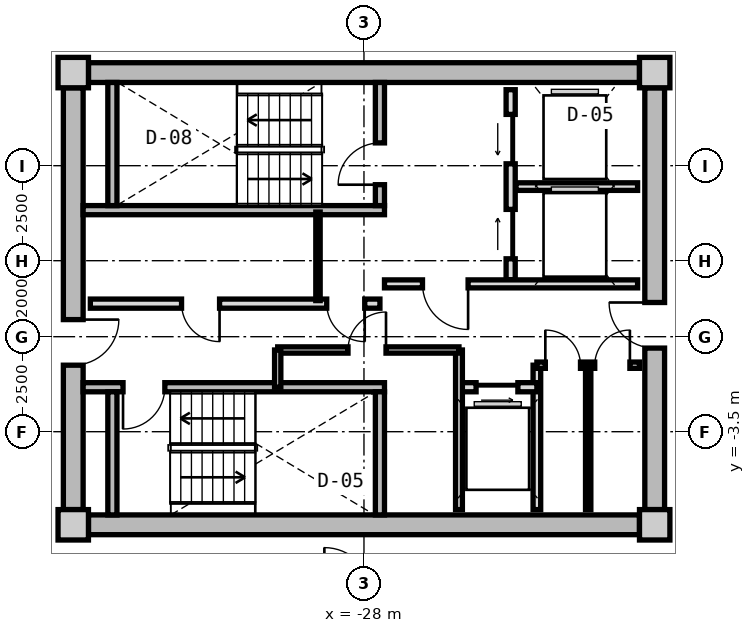
"""IFC4 building model, lengths in metres.
Left out: names, types, materials, properties, quantities, classifications, styles, units other than length and angle.
Written with IfcOpenShell. Run it as: python <this file> out.ifc"""

import sys

from ifc_helpers import new_model, si_unit, direction, frame, frame_2d, origin, origin_2d, place, context, subcontext, project, spatial, rectangle, extrude, source, transform, mapped, element, fill, save


model = new_model("IFC4")
c1 = context("Model", 3, precision=1e-05, world=origin(), true_north=direction((0.0, 1.0)))
c2 = subcontext(c1, "Body", "Model", "MODEL_VIEW")
j1 = project(units=[si_unit("LENGTHUNIT", "METRE"), si_unit("PLANEANGLEUNIT", "RADIAN")], contexts=[c1])
p1 = place(None, origin())
s1 = spatial("IfcSite", under=j1, at=p1, CompositionType="ELEMENT")
p2 = place(p1, origin())
s2 = spatial("IfcBuilding", under=s1, at=p2, CompositionType="ELEMENT")
p3 = place(p2, frame((0.0, 0.0, 238.3)))
s3 = spatial("IfcBuildingStorey", under=s2, at=p3, CompositionType="ELEMENT", Elevation=238.3)
m1 = source(origin(), c2, "Body", "SweptSolid", [
    extrude(rectangle(XDim=0.8, YDim=0.8, at=origin_2d()), origin(), (0.0, 0.0, 1.0), 3.05),
])
for number, where, z_axis, x_axis in (
    (1, (-35.65, -5.95, 0.0), (0.0, 0.0, 1.0), (1.0, 0.0, 0.0)),
    (2, (-20.35, -5.95, 0.0), (0.0, 0.0, 1.0), (1.0, 0.0, 0.0)),
    (3, (-20.35, 5.95, 0.0), (0.0, 0.0, 1.0), (1.0, 0.0, 0.0)),
    (4, (-35.65, 5.95, 0.0), (0.0, 0.0, 1.0), (1.0, 0.0, 0.0)),
):
    element("IfcColumn", number, at=place(p3, frame(where, z_axis=z_axis, x_axis=x_axis)), inside=s3, PredefinedType="COLUMN", context=c2, shape_type="MappedRepresentation", body=[
        mapped(m1, transform((0.0, 0.0, 0.0), x_axis=(1.0, 0.0, 0.0), y_axis=(0.0, 1.0, 0.0), z_axis=(0.0, 0.0, 1.0), scale=1.0)),
    ])
m2 = source(origin(), c2, "Body", "SweptSolid", [
    extrude(rectangle(XDim=14.5, YDim=0.52, at=frame_2d((7.25, 0.0))), origin(), (0.0, 0.0, 1.0), 2.81),
])
for number, where, z_axis, x_axis in (
    (5, (-35.25, 5.95, 0.0), (0.0, 0.0, 1.0), (1.0, 0.0, 0.0)),
    (6, (-20.75, -5.95, 0.0), (0.0, 0.0, 1.0), (-1.0, 0.0, 0.0)),
):
    element("IfcWall", number, at=place(p3, frame(where, z_axis=z_axis, x_axis=x_axis)), inside=s3, PredefinedType="SHEAR", context=c2, shape_type="MappedRepresentation", body=[
        mapped(m2, transform((0.0, 0.0, 0.0), x_axis=(1.0, 0.0, 0.0), y_axis=(0.0, 1.0, 0.0), z_axis=(0.0, 0.0, 1.0), scale=1.0)),
    ])
m3 = source(origin(), c2, "Body", "SweptSolid", [
    extrude(rectangle(XDim=11.1, YDim=0.52, at=frame_2d((5.55, 0.0))), origin(), (0.0, 0.0, 1.0), 2.81),
])
p4 = place(p3, frame((-35.65, -5.55, 0.0), z_axis=(0.0, 0.0, 1.0), x_axis=(0.0, 1.0, 0.0)))
e7 = element("IfcWall", 7, at=p4, inside=s3, PredefinedType="SHEAR", context=c2, shape_type="MappedRepresentation", body=[
    mapped(m3, transform((0.0, 0.0, 0.0), x_axis=(1.0, 0.0, 0.0), y_axis=(0.0, 1.0, 0.0), z_axis=(0.0, 0.0, 1.0), scale=1.0)),
])
p5 = place(p4, frame((3.8, 0.0, 0.0)))
e8 = element("IfcOpeningElement", 8, at=p5, cuts=e7, PredefinedType="OPENING", context=c2, shape_type="SweptSolid", body=[
    extrude(rectangle(XDim=1.2, YDim=2.15, at=frame_2d((0.6, 1.075))), frame((0.0, 0.27, 0.0), z_axis=(0.0, -1.0, 0.0), x_axis=(1.0, 0.0, 0.0)), (0.0, 0.0, 1.0), 0.54),
])
p6 = place(p3, frame((-20.35, 5.55, 0.0), z_axis=(0.0, 0.0, 1.0), x_axis=(0.0, -1.0, 0.0)))
e9 = element("IfcWall", 9, at=p6, inside=s3, PredefinedType="SHEAR", context=c2, shape_type="MappedRepresentation", body=[
    mapped(m3, transform((0.0, 0.0, 0.0), x_axis=(1.0, 0.0, 0.0), y_axis=(0.0, 1.0, 0.0), z_axis=(0.0, 0.0, 1.0), scale=1.0)),
])
p7 = place(p6, frame((5.65, 0.0, 0.0)))
e10 = element("IfcOpeningElement", 10, at=p7, cuts=e9, PredefinedType="OPENING", context=c2, shape_type="SweptSolid", body=[
    extrude(rectangle(XDim=1.2, YDim=2.15, at=frame_2d((0.6, 1.075))), frame((0.0, 0.27, 0.0), z_axis=(0.0, -1.0, 0.0), x_axis=(1.0, 0.0, 0.0)), (0.0, 0.0, 1.0), 0.54),
])
m4 = source(origin(), c2, "Body", "SweptSolid", [
    extrude(rectangle(XDim=7.93, YDim=0.24, at=frame_2d((3.965, 0.0))), origin(), (0.0, 0.0, 1.0), 2.81),
])
p8 = place(p3, frame((-35.39, 2.33, 0.0), z_axis=(0.0, 0.0, 1.0), x_axis=(1.0, 0.0, 0.0)))
e11 = element("IfcWall", 11, at=p8, inside=s3, PredefinedType="PARTITIONING", context=c2, shape_type="MappedRepresentation", body=[
    mapped(m4, transform((0.0, 0.0, 0.0), x_axis=(1.0, 0.0, 0.0), y_axis=(0.0, 1.0, 0.0), z_axis=(0.0, 0.0, 1.0), scale=1.0)),
])
m5 = source(origin(), c2, "Body", "SweptSolid", [
    extrude(rectangle(XDim=3.24, YDim=0.24, at=frame_2d((1.62, 0.0))), origin(), (0.0, 0.0, 1.0), 2.81),
])
p9 = place(p3, frame((-34.62, 2.45, 0.0), z_axis=(0.0, 0.0, 1.0), x_axis=(0.0, 1.0, 0.0)))
e12 = element("IfcWall", 12, at=p9, inside=s3, PredefinedType="PARTITIONING", context=c2, shape_type="MappedRepresentation", body=[
    mapped(m5, transform((0.0, 0.0, 0.0), x_axis=(1.0, 0.0, 0.0), y_axis=(0.0, 1.0, 0.0), z_axis=(0.0, 0.0, 1.0), scale=1.0)),
])
p10 = place(p3, frame((-27.58, 2.45, 0.0), z_axis=(0.0, 0.0, 1.0), x_axis=(0.0, 1.0, 0.0)))
e13 = element("IfcWall", 13, at=p10, inside=s3, PredefinedType="PARTITIONING", context=c2, shape_type="MappedRepresentation", body=[
    mapped(m5, transform((0.0, 0.0, 0.0), x_axis=(1.0, 0.0, 0.0), y_axis=(0.0, 1.0, 0.0), z_axis=(0.0, 0.0, 1.0), scale=1.0)),
])
p11 = place(p10, frame((0.55, 0.0, 0.0)))
e14 = element("IfcOpeningElement", 14, at=p11, cuts=e13, PredefinedType="OPENING", context=c2, shape_type="SweptSolid", body=[
    extrude(rectangle(XDim=1.1, YDim=2.15, at=frame_2d((0.55, 1.075))), frame((0.0, 0.13, 0.0), z_axis=(0.0, -1.0, 0.0), x_axis=(1.0, 0.0, 0.0)), (0.0, 0.0, 1.0), 0.26),
])
p12 = place(p3, frame((-35.39, -2.33, 0.0), z_axis=(0.0, 0.0, 1.0), x_axis=(1.0, 0.0, 0.0)))
e15 = element("IfcWall", 15, at=p12, inside=s3, PredefinedType="PARTITIONING", context=c2, shape_type="MappedRepresentation", body=[
    mapped(m4, transform((0.0, 0.0, 0.0), x_axis=(1.0, 0.0, 0.0), y_axis=(0.0, 1.0, 0.0), z_axis=(0.0, 0.0, 1.0), scale=1.0)),
])
p13 = place(p12, frame((1.05, 0.0, 0.0)))
e16 = element("IfcOpeningElement", 16, at=p13, cuts=e15, PredefinedType="OPENING", context=c2, shape_type="SweptSolid", body=[
    extrude(rectangle(XDim=1.1, YDim=2.15, at=frame_2d((0.55, 1.075))), frame((0.0, 0.13, 0.0), z_axis=(0.0, -1.0, 0.0), x_axis=(1.0, 0.0, 0.0)), (0.0, 0.0, 1.0), 0.26),
])
for number, where, z_axis, x_axis in (
    (17, (-34.62, -5.69, 0.0), (0.0, 0.0, 1.0), (0.0, 1.0, 0.0)),
    (18, (-27.58, -5.69, 0.0), (0.0, 0.0, 1.0), (0.0, 1.0, 0.0)),
):
    element("IfcWall", number, at=place(p3, frame(where, z_axis=z_axis, x_axis=x_axis)), inside=s3, PredefinedType="PARTITIONING", context=c2, shape_type="MappedRepresentation", body=[
        mapped(m5, transform((0.0, 0.0, 0.0), x_axis=(1.0, 0.0, 0.0), y_axis=(0.0, 1.0, 0.0), z_axis=(0.0, 0.0, 1.0), scale=1.0)),
    ])
m6 = source(origin(), c2, "Body", "SweptSolid", [
    extrude(rectangle(XDim=5.0, YDim=0.24, at=frame_2d((2.5, 0.0))), origin(), (0.0, 0.0, 1.0), 2.795),
])
p14 = place(p3, frame((-24.14, 0.5, 0.0), z_axis=(0.0, 0.0, 1.0), x_axis=(0.0, 1.0, 0.0)))
e19 = element("IfcWall", 19, at=p14, inside=s3, PredefinedType="PARTITIONING", context=c2, shape_type="MappedRepresentation", body=[
    mapped(m6, transform((0.0, 0.0, 0.0), x_axis=(1.0, 0.0, 0.0), y_axis=(0.0, 1.0, 0.0), z_axis=(0.0, 0.0, 1.0), scale=1.0)),
])
p15 = place(p14, frame((3.05, 0.0, 0.0)))
e20 = element("IfcOpeningElement", 20, at=p15, cuts=e19, PredefinedType="OPENING", context=c2, shape_type="SweptSolid", body=[
    extrude(rectangle(XDim=1.3, YDim=2.2, at=frame_2d((0.65, 1.1))), frame((0.0, 0.13, 0.0), z_axis=(0.0, -1.0, 0.0), x_axis=(1.0, 0.0, 0.0)), (0.0, 0.0, 1.0), 0.26),
])
p16 = place(p14, frame((0.55, 0.0, 0.0)))
e21 = element("IfcOpeningElement", 21, at=p16, cuts=e19, PredefinedType="OPENING", context=c2, shape_type="SweptSolid", body=[
    extrude(rectangle(XDim=1.3, YDim=2.2, at=frame_2d((0.65, 1.1))), frame((0.0, 0.13, 0.0), z_axis=(0.0, -1.0, 0.0), x_axis=(1.0, 0.0, 0.0)), (0.0, 0.0, 1.0), 0.26),
])
m7 = source(origin(), c2, "Body", "SweptSolid", [
    extrude(rectangle(XDim=3.2, YDim=0.2, at=frame_2d((1.6, 0.0))), origin(), (0.0, 0.0, 1.0), 2.795),
])
p17 = place(p3, frame((-24.0, 2.95, 0.0), z_axis=(0.0, 0.0, 1.0), x_axis=(1.0, 0.0, 0.0)))
e22 = element("IfcWall", 22, at=p17, inside=s3, PredefinedType="PARTITIONING", context=c2, shape_type="MappedRepresentation", body=[
    mapped(m7, transform((0.0, 0.0, 0.0), x_axis=(1.0, 0.0, 0.0), y_axis=(0.0, 1.0, 0.0), z_axis=(0.0, 0.0, 1.0), scale=1.0)),
])
m8 = source(origin(), c2, "Body", "SweptSolid", [
    extrude(rectangle(XDim=6.66, YDim=0.21, at=frame_2d((3.33, 0.0))), origin(), (0.0, 0.0, 1.0), 2.795),
])
p18 = place(p3, frame((-27.46, 0.39, 0.0), z_axis=(0.0, 0.0, 1.0), x_axis=(1.0, 0.0, 0.0)))
e23 = element("IfcWall", 23, at=p18, inside=s3, PredefinedType="PARTITIONING", context=c2, shape_type="MappedRepresentation", body=[
    mapped(m8, transform((0.0, 0.0, 0.0), x_axis=(1.0, 0.0, 0.0), y_axis=(0.0, 1.0, 0.0), z_axis=(0.0, 0.0, 1.0), scale=1.0)),
])
p19 = place(p18, frame((1.0, 0.0, 0.0)))
e24 = element("IfcOpeningElement", 24, at=p19, cuts=e23, PredefinedType="OPENING", context=c2, shape_type="SweptSolid", body=[
    extrude(rectangle(XDim=1.2, YDim=2.15, at=frame_2d((0.6, 1.075))), frame((0.0, 0.115, 0.0), z_axis=(0.0, -1.0, 0.0), x_axis=(1.0, 0.0, 0.0)), (0.0, 0.0, 1.0), 0.23),
])
m9 = source(origin(), c2, "Body", "SweptSolid", [
    extrude(rectangle(XDim=7.62, YDim=0.24, at=frame_2d((3.81, 0.0))), origin(), (0.0, 0.0, 1.0), 2.795),
])
p20 = place(p3, frame((-35.2, -0.13, 0.0), z_axis=(0.0, 0.0, 1.0), x_axis=(1.0, 0.0, 0.0)))
e25 = element("IfcWall", 25, at=p20, inside=s3, PredefinedType="PARTITIONING", context=c2, shape_type="MappedRepresentation", body=[
    mapped(m9, transform((0.0, 0.0, 0.0), x_axis=(1.0, 0.0, 0.0), y_axis=(0.0, 1.0, 0.0), z_axis=(0.0, 0.0, 1.0), scale=1.0)),
])
p21 = place(p20, frame((6.22, 0.0, 0.0)))
e26 = element("IfcOpeningElement", 26, at=p21, cuts=e25, PredefinedType="OPENING", context=c2, shape_type="SweptSolid", body=[
    extrude(rectangle(XDim=1.0, YDim=2.1, at=frame_2d((0.5, 1.05))), frame((0.0, 0.13, 0.0), z_axis=(0.0, -1.0, 0.0), x_axis=(1.0, 0.0, 0.0)), (0.0, 0.0, 1.0), 0.26),
])
p22 = place(p20, frame((2.4, 0.0, 0.0)))
e27 = element("IfcOpeningElement", 27, at=p22, cuts=e25, PredefinedType="OPENING", context=c2, shape_type="SweptSolid", body=[
    extrude(rectangle(XDim=1.0, YDim=2.1, at=frame_2d((0.5, 1.05))), frame((0.0, 0.13, 0.0), z_axis=(0.0, -1.0, 0.0), x_axis=(1.0, 0.0, 0.0)), (0.0, 0.0, 1.0), 0.26),
])
m10 = source(origin(), c2, "Body", "SweptSolid", [
    extrude(rectangle(XDim=2.33, YDim=0.115, at=frame_2d((1.165, 0.0))), origin(), (0.0, 0.0, 1.0), 2.795),
])
p23 = place(p3, frame((-29.21, -0.05, 0.0), z_axis=(0.0, 0.0, 1.0), x_axis=(0.0, 1.0, 0.0)))
e28 = element("IfcWall", 28, at=p23, inside=s3, PredefinedType="PARTITIONING", context=c2, shape_type="MappedRepresentation", body=[
    mapped(m10, transform((0.0, 0.0, 0.0), x_axis=(1.0, 0.0, 0.0), y_axis=(0.0, 1.0, 0.0), z_axis=(0.0, 0.0, 1.0), scale=1.0)),
])
m11 = source(origin(), c2, "Body", "SweptSolid", [
    extrude(rectangle(XDim=3.8, YDim=0.2, at=frame_2d((1.9, 0.0))), origin(), (0.0, 0.0, 1.0), 2.795),
])
p24 = place(p3, frame((-23.45, -5.55, 0.0), z_axis=(0.0, 0.0, 1.0), x_axis=(0.0, 1.0, 0.0)))
e29 = element("IfcWall", 29, at=p24, inside=s3, PredefinedType="PARTITIONING", context=c2, shape_type="MappedRepresentation", body=[
    mapped(m11, transform((0.0, 0.0, 0.0), x_axis=(1.0, 0.0, 0.0), y_axis=(0.0, 1.0, 0.0), z_axis=(0.0, 0.0, 1.0), scale=1.0)),
])
m12 = source(origin(), c2, "Body", "SweptSolid", [
    extrude(rectangle(XDim=2.05, YDim=0.24, at=frame_2d((1.025, 0.0))), origin(), (0.0, 0.0, 1.0), 2.795),
])
p25 = place(p3, frame((-25.5, -2.33, 0.0), z_axis=(0.0, 0.0, 1.0), x_axis=(1.0, 0.0, 0.0)))
e30 = element("IfcWall", 30, at=p25, inside=s3, PredefinedType="PARTITIONING", context=c2, shape_type="MappedRepresentation", body=[
    mapped(m12, transform((0.0, 0.0, 0.0), x_axis=(1.0, 0.0, 0.0), y_axis=(0.0, 1.0, 0.0), z_axis=(0.0, 0.0, 1.0), scale=1.0)),
])
p26 = place(p25, frame((0.45, 0.0, 0.0)))
e31 = element("IfcOpeningElement", 31, at=p26, cuts=e30, PredefinedType="OPENING", context=c2, shape_type="SweptSolid", body=[
    extrude(rectangle(XDim=1.1, YDim=2.2, at=frame_2d((0.55, 1.1))), frame((0.0, 0.13, 0.0), z_axis=(0.0, -1.0, 0.0), x_axis=(1.0, 0.0, 0.0)), (0.0, 0.0, 1.0), 0.26),
])
m13 = source(origin(), c2, "Body", "SweptSolid", [
    extrude(rectangle(XDim=4.2, YDim=0.18, at=frame_2d((2.1, 0.0))), origin(), (0.0, 0.0, 1.0), 2.795),
])
p27 = place(p3, frame((-25.5, -5.55, 0.0), z_axis=(0.0, 0.0, 1.0), x_axis=(0.0, 1.0, 0.0)))
e32 = element("IfcWall", 32, at=p27, inside=s3, PredefinedType="PARTITIONING", context=c2, shape_type="MappedRepresentation", body=[
    mapped(m13, transform((0.0, 0.0, 0.0), x_axis=(1.0, 0.0, 0.0), y_axis=(0.0, 1.0, 0.0), z_axis=(0.0, 0.0, 1.0), scale=1.0)),
])
m14 = source(origin(), c2, "Body", "SweptSolid", [
    extrude(rectangle(XDim=4.77, YDim=0.165, at=frame_2d((2.385, 0.0))), origin(), (0.0, 0.0, 1.0), 2.795),
])
p28 = place(p3, frame((-30.27, -1.35, 0.0), z_axis=(0.0, 0.0, 1.0), x_axis=(1.0, 0.0, 0.0)))
e33 = element("IfcWall", 33, at=p28, inside=s3, PredefinedType="PARTITIONING", context=c2, shape_type="MappedRepresentation", body=[
    mapped(m14, transform((0.0, 0.0, 0.0), x_axis=(1.0, 0.0, 0.0), y_axis=(0.0, 1.0, 0.0), z_axis=(0.0, 0.0, 1.0), scale=1.0)),
])
p29 = place(p28, frame((1.85, 0.0, 0.0)))
e34 = element("IfcOpeningElement", 34, at=p29, cuts=e33, PredefinedType="OPENING", context=c2, shape_type="SweptSolid", body=[
    extrude(rectangle(XDim=1.0, YDim=2.1, at=frame_2d((0.5, 1.05))), frame((0.0, 0.093, 0.0), z_axis=(0.0, -1.0, 0.0), x_axis=(1.0, 0.0, 0.0)), (0.0, 0.0, 1.0), 0.185),
])
m15 = source(origin(), c2, "Body", "SweptSolid", [
    extrude(rectangle(XDim=0.98, YDim=0.165, at=frame_2d((0.49, 0.0))), origin(), (0.0, 0.0, 1.0), 2.795),
])
p30 = place(p3, frame((-30.27, -2.33, 0.0), z_axis=(0.0, 0.0, 1.0), x_axis=(0.0, 1.0, 0.0)))
e35 = element("IfcWall", 35, at=p30, inside=s3, PredefinedType="PARTITIONING", context=c2, shape_type="MappedRepresentation", body=[
    mapped(m15, transform((0.0, 0.0, 0.0), x_axis=(1.0, 0.0, 0.0), y_axis=(0.0, 1.0, 0.0), z_axis=(0.0, 0.0, 1.0), scale=1.0)),
])
m16 = source(origin(), c2, "Body", "SweptSolid", [
    extrude(rectangle(XDim=2.7, YDim=0.165, at=frame_2d((1.35, 0.0))), origin(), (0.0, 0.0, 1.0), 2.795),
])
p31 = place(p3, frame((-23.45, -1.75, 0.0), z_axis=(0.0, 0.0, 1.0), x_axis=(1.0, 0.0, 0.0)))
e36 = element("IfcWall", 36, at=p31, inside=s3, PredefinedType="PARTITIONING", context=c2, shape_type="MappedRepresentation", body=[
    mapped(m16, transform((0.0, 0.0, 0.0), x_axis=(1.0, 0.0, 0.0), y_axis=(0.0, 1.0, 0.0), z_axis=(0.0, 0.0, 1.0), scale=1.0)),
])
p32 = place(p31, frame((0.222, 0.0, 0.0)))
e37 = element("IfcOpeningElement", 37, at=p32, cuts=e36, PredefinedType="OPENING", context=c2, shape_type="SweptSolid", body=[
    extrude(rectangle(XDim=0.925, YDim=2.1, at=frame_2d((0.462, 1.05))), frame((0.0, 0.093, 0.0), z_axis=(0.0, -1.0, 0.0), x_axis=(1.0, 0.0, 0.0)), (0.0, 0.0, 1.0), 0.185),
])
p33 = place(p31, frame((1.522, 0.0, 0.0)))
e38 = element("IfcOpeningElement", 38, at=p33, cuts=e36, PredefinedType="OPENING", context=c2, shape_type="SweptSolid", body=[
    extrude(rectangle(XDim=0.925, YDim=2.1, at=frame_2d((0.462, 1.05))), frame((0.0, 0.093, 0.0), z_axis=(0.0, -1.0, 0.0), x_axis=(1.0, 0.0, 0.0)), (0.0, 0.0, 1.0), 0.185),
])
m17 = source(origin(), c2, "Body", "SweptSolid", [
    extrude(rectangle(XDim=3.8, YDim=0.14, at=frame_2d((1.9, 0.0))), origin(), (0.0, 0.0, 1.0), 2.795),
])
p34 = place(p3, frame((-22.1, -5.55, 0.0), z_axis=(0.0, 0.0, 1.0), x_axis=(0.0, 1.0, 0.0)))
e39 = element("IfcWall", 39, at=p34, inside=s3, PredefinedType="PARTITIONING", context=c2, shape_type="MappedRepresentation", body=[
    mapped(m17, transform((0.0, 0.0, 0.0), x_axis=(1.0, 0.0, 0.0), y_axis=(0.0, 1.0, 0.0), z_axis=(0.0, 0.0, 1.0), scale=1.0)),
])
m18 = source(origin(), c2, "Body", "SweptSolid", [
    extrude(rectangle(XDim=1.1, YDim=2.15, at=frame_2d((0.55, 1.075))), frame((0.0, 0.025, 0.0), z_axis=(0.0, -1.0, 0.0), x_axis=(1.0, 0.0, 0.0)), (0.0, 0.0, 1.0), 0.05),
])
p35 = place(p11, origin())
e40 = element("IfcDoor", 40, at=p35, inside=s3, OperationType="SINGLE_SWING_LEFT", PredefinedType="DOOR", context=c2, shape_type="MappedRepresentation", body=[
    mapped(m18, transform((0.0, 0.0, 0.0), x_axis=(1.0, 0.0, 0.0), y_axis=(0.0, 1.0, 0.0), z_axis=(0.0, 0.0, 1.0), scale=1.0)),
])
fill(e14, e40)
p36 = place(p13, frame((1.1, 0.0, 0.0), z_axis=(0.0, 0.0, 1.0), x_axis=(-1.0, 0.0, 0.0)))
e41 = element("IfcDoor", 41, at=p36, inside=s3, OperationType="SINGLE_SWING_RIGHT", PredefinedType="DOOR", context=c2, shape_type="MappedRepresentation", body=[
    mapped(m18, transform((0.0, 0.0, 0.0), x_axis=(1.0, 0.0, 0.0), y_axis=(0.0, 1.0, 0.0), z_axis=(0.0, 0.0, 1.0), scale=1.0)),
])
fill(e16, e41)
m19 = source(origin(), c2, "Body", "SweptSolid", [
    extrude(rectangle(XDim=1.3, YDim=2.2, at=frame_2d((0.65, 1.1))), frame((0.0, 0.025, 0.0), z_axis=(0.0, -1.0, 0.0), x_axis=(1.0, 0.0, 0.0)), (0.0, 0.0, 1.0), 0.05),
])
p37 = place(p15, origin())
e42 = element("IfcDoor", 42, at=p37, inside=s3, OperationType="SLIDING_TO_LEFT", PredefinedType="DOOR", context=c2, shape_type="MappedRepresentation", body=[
    mapped(m19, transform((0.0, 0.0, 0.0), x_axis=(1.0, 0.0, 0.0), y_axis=(0.0, 1.0, 0.0), z_axis=(0.0, 0.0, 1.0), scale=1.0)),
])
fill(e20, e42)
p38 = place(p16, origin())
e43 = element("IfcDoor", 43, at=p38, inside=s3, OperationType="SLIDING_TO_RIGHT", PredefinedType="DOOR", context=c2, shape_type="MappedRepresentation", body=[
    mapped(m19, transform((0.0, 0.0, 0.0), x_axis=(1.0, 0.0, 0.0), y_axis=(0.0, 1.0, 0.0), z_axis=(0.0, 0.0, 1.0), scale=1.0)),
])
fill(e21, e43)
m20 = source(origin(), c2, "Body", "SweptSolid", [
    extrude(rectangle(XDim=1.2, YDim=2.15, at=frame_2d((0.6, 1.075))), frame((0.0, 0.025, 0.0), z_axis=(0.0, -1.0, 0.0), x_axis=(1.0, 0.0, 0.0)), (0.0, 0.0, 1.0), 0.05),
])
p39 = place(p19, frame((1.2, 0.0, 0.0), z_axis=(0.0, 0.0, 1.0), x_axis=(-1.0, 0.0, 0.0)))
e44 = element("IfcDoor", 44, at=p39, inside=s3, OperationType="SINGLE_SWING_LEFT", PredefinedType="DOOR", context=c2, shape_type="MappedRepresentation", body=[
    mapped(m20, transform((0.0, 0.0, 0.0), x_axis=(1.0, 0.0, 0.0), y_axis=(0.0, 1.0, 0.0), z_axis=(0.0, 0.0, 1.0), scale=1.0)),
])
fill(e24, e44)
p40 = place(p5, frame((1.2, 0.0, 0.0), z_axis=(0.0, 0.0, 1.0), x_axis=(-1.0, 0.0, 0.0)))
e45 = element("IfcDoor", 45, at=p40, inside=s3, OperationType="SINGLE_SWING_LEFT", PredefinedType="DOOR", context=c2, shape_type="MappedRepresentation", body=[
    mapped(m20, transform((0.0, 0.0, 0.0), x_axis=(1.0, 0.0, 0.0), y_axis=(0.0, 1.0, 0.0), z_axis=(0.0, 0.0, 1.0), scale=1.0)),
])
fill(e8, e45)
p41 = place(p7, frame((1.2, 0.0, 0.0), z_axis=(0.0, 0.0, 1.0), x_axis=(-1.0, 0.0, 0.0)))
e46 = element("IfcDoor", 46, at=p41, inside=s3, OperationType="SINGLE_SWING_RIGHT", PredefinedType="DOOR", context=c2, shape_type="MappedRepresentation", body=[
    mapped(m20, transform((0.0, 0.0, 0.0), x_axis=(1.0, 0.0, 0.0), y_axis=(0.0, 1.0, 0.0), z_axis=(0.0, 0.0, 1.0), scale=1.0)),
])
fill(e10, e46)
m21 = source(origin(), c2, "Body", "SweptSolid", [
    extrude(rectangle(XDim=1.0, YDim=2.1, at=frame_2d((0.5, 1.05))), frame((0.0, 0.025, 0.0), z_axis=(0.0, -1.0, 0.0), x_axis=(1.0, 0.0, 0.0)), (0.0, 0.0, 1.0), 0.05),
])
p42 = place(p21, frame((1.0, 0.0, 0.0), z_axis=(0.0, 0.0, 1.0), x_axis=(-1.0, 0.0, 0.0)))
e47 = element("IfcDoor", 47, at=p42, inside=s3, OperationType="SINGLE_SWING_LEFT", PredefinedType="DOOR", context=c2, shape_type="MappedRepresentation", body=[
    mapped(m21, transform((0.0, 0.0, 0.0), x_axis=(1.0, 0.0, 0.0), y_axis=(0.0, 1.0, 0.0), z_axis=(0.0, 0.0, 1.0), scale=1.0)),
])
fill(e26, e47)
p43 = place(p22, frame((1.0, 0.0, 0.0), z_axis=(0.0, 0.0, 1.0), x_axis=(-1.0, 0.0, 0.0)))
e48 = element("IfcDoor", 48, at=p43, inside=s3, OperationType="SINGLE_SWING_LEFT", PredefinedType="DOOR", context=c2, shape_type="MappedRepresentation", body=[
    mapped(m21, transform((0.0, 0.0, 0.0), x_axis=(1.0, 0.0, 0.0), y_axis=(0.0, 1.0, 0.0), z_axis=(0.0, 0.0, 1.0), scale=1.0)),
])
fill(e27, e48)
m22 = source(origin(), c2, "Body", "SweptSolid", [
    extrude(rectangle(XDim=1.1, YDim=2.2, at=frame_2d((0.55, 1.1))), frame((0.0, 0.025, 0.0), z_axis=(0.0, -1.0, 0.0), x_axis=(1.0, 0.0, 0.0)), (0.0, 0.0, 1.0), 0.05),
])
p44 = place(p26, frame((1.1, 0.0, 0.0), z_axis=(0.0, 0.0, 1.0), x_axis=(-1.0, 0.0, 0.0)))
e49 = element("IfcDoor", 49, at=p44, inside=s3, OperationType="SLIDING_TO_RIGHT", PredefinedType="DOOR", context=c2, shape_type="MappedRepresentation", body=[
    mapped(m22, transform((0.0, 0.0, 0.0), x_axis=(1.0, 0.0, 0.0), y_axis=(0.0, 1.0, 0.0), z_axis=(0.0, 0.0, 1.0), scale=1.0)),
])
fill(e31, e49)
p45 = place(p29, origin())
e50 = element("IfcDoor", 50, at=p45, inside=s3, OperationType="SINGLE_SWING_RIGHT", PredefinedType="DOOR", context=c2, shape_type="MappedRepresentation", body=[
    mapped(m21, transform((0.0, 0.0, 0.0), x_axis=(1.0, 0.0, 0.0), y_axis=(0.0, 1.0, 0.0), z_axis=(0.0, 0.0, 1.0), scale=1.0)),
])
fill(e34, e50)
m23 = source(origin(), c2, "Body", "SweptSolid", [
    extrude(rectangle(XDim=0.925, YDim=2.1, at=frame_2d((0.462, 1.05))), frame((0.0, 0.025, 0.0), z_axis=(0.0, -1.0, 0.0), x_axis=(1.0, 0.0, 0.0)), (0.0, 0.0, 1.0), 0.05),
])
p46 = place(p32, origin())
e51 = element("IfcDoor", 51, at=p46, inside=s3, OperationType="SINGLE_SWING_LEFT", PredefinedType="DOOR", context=c2, shape_type="MappedRepresentation", body=[
    mapped(m23, transform((0.0, 0.0, 0.0), x_axis=(1.0, 0.0, 0.0), y_axis=(0.0, 1.0, 0.0), z_axis=(0.0, 0.0, 1.0), scale=1.0)),
])
fill(e37, e51)
p47 = place(p33, origin())
e52 = element("IfcDoor", 52, at=p47, inside=s3, OperationType="SINGLE_SWING_RIGHT", PredefinedType="DOOR", context=c2, shape_type="MappedRepresentation", body=[
    mapped(m23, transform((0.0, 0.0, 0.0), x_axis=(1.0, 0.0, 0.0), y_axis=(0.0, 1.0, 0.0), z_axis=(0.0, 0.0, 1.0), scale=1.0)),
])
fill(e38, e52)
save(model, sys.argv[1])
